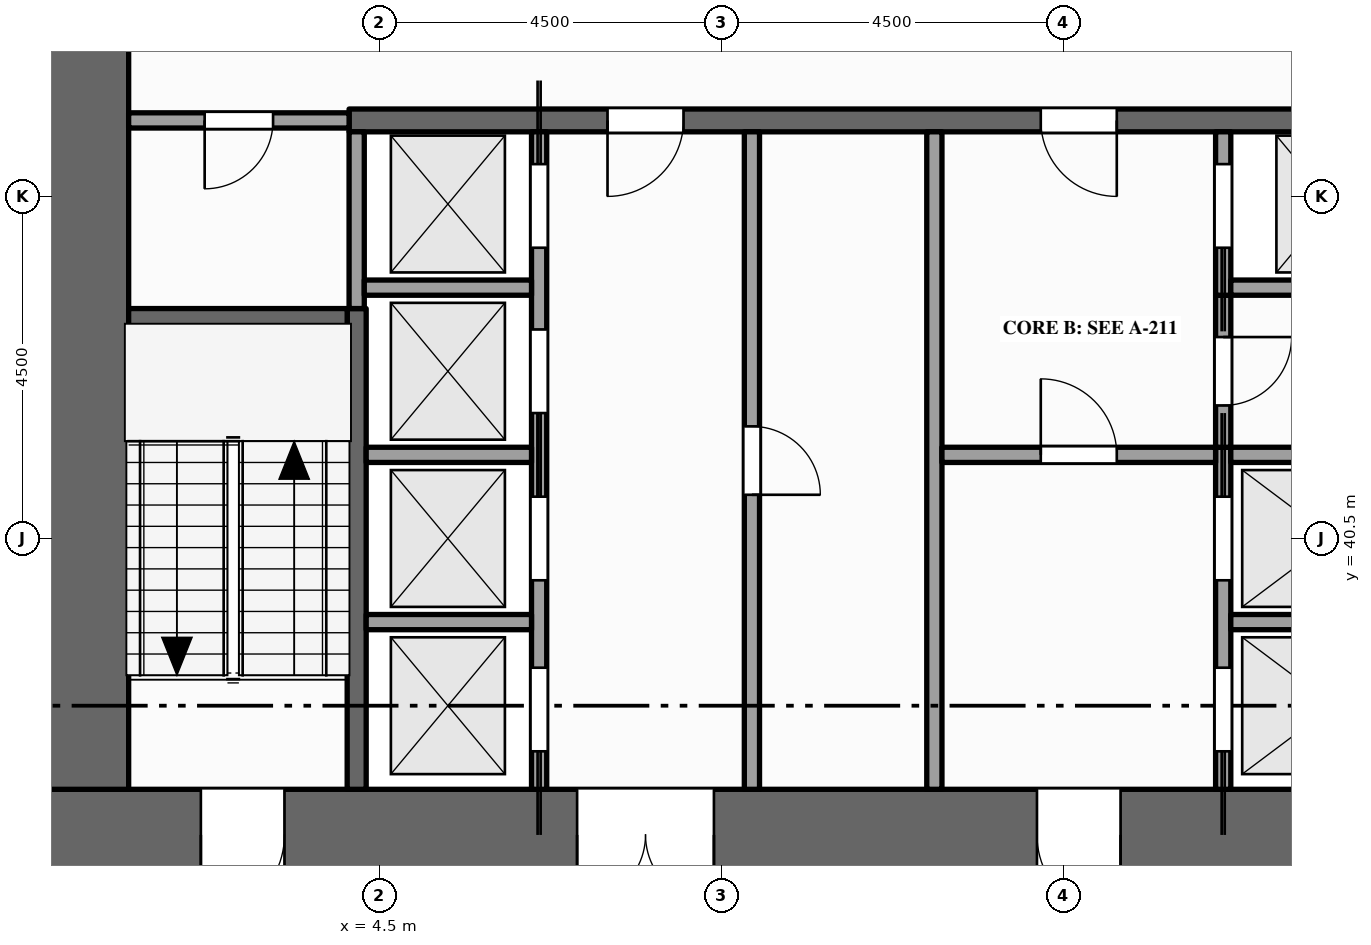
"""IFC4 building model, lengths in metres.
Left out: names, types, materials, properties, quantities, classifications, styles, units other than length and angle.
Written with IfcOpenShell. Run it as: python <this file> out.ifc"""

import sys

from ifc_helpers import new_model, si_unit, direction, frame, frame_2d, origin, place, context, subcontext, project, spatial, rectangle, extrude, element, fill, save


model = new_model("IFC4")
c1 = context("Model", 3, precision=1e-05, world=origin(), true_north=direction((0.0, 1.0)))
c2 = subcontext(c1, "Body", "Model", "MODEL_VIEW")
j1 = project(units=[si_unit("LENGTHUNIT", "METRE"), si_unit("PLANEANGLEUNIT", "RADIAN")], contexts=[c1])
p1 = place(None, origin())
s1 = spatial("IfcSite", under=j1, at=p1, CompositionType="ELEMENT")
p2 = place(p1, origin())
s2 = spatial("IfcBuilding", under=s1, at=p2, CompositionType="ELEMENT")
p3 = place(p2, frame((0.0, 0.0, 57.0)))
s3 = spatial("IfcBuildingStorey", under=s2, at=p3, CompositionType="ELEMENT", Elevation=57.0)
p4 = place(p3, frame((0.0, 36.6, -0.15), z_axis=(0.0, 0.0, 1.0), x_axis=(1.0, 0.0, 0.0)))
e1 = element("IfcWall", 1, at=p4, inside=s3, PredefinedType="SHEAR", context=c2, shape_type="SweptSolid", body=[
    extrude(rectangle(XDim=22.5, YDim=1.2, at=frame_2d((11.25, 0.0))), origin(), (0.0, 0.0, 1.0), 4.0),
])
p5 = place(p4, frame((7.1, 0.0, 0.15)))
e2 = element("IfcOpeningElement", 2, at=p5, cuts=e1, PredefinedType="OPENING", context=c2, shape_type="SweptSolid", body=[
    extrude(rectangle(XDim=1.8, YDim=2.1, at=frame_2d((0.9, 1.05))), frame((0.0, 0.61, 0.0), z_axis=(0.0, -1.0, 0.0), x_axis=(1.0, 0.0, 0.0)), (0.0, 0.0, 1.0), 1.22),
])
p6 = place(p4, frame((13.15, 0.0, 0.15)))
e3 = element("IfcOpeningElement", 3, at=p6, cuts=e1, PredefinedType="OPENING", context=c2, shape_type="SweptSolid", body=[
    extrude(rectangle(XDim=1.1, YDim=2.1, at=frame_2d((0.55, 1.05))), frame((0.0, 0.61, 0.0), z_axis=(0.0, -1.0, 0.0), x_axis=(1.0, 0.0, 0.0)), (0.0, 0.0, 1.0), 1.22),
])
p7 = place(p4, frame((2.15, 0.0, 0.15)))
e4 = element("IfcOpeningElement", 4, at=p7, cuts=e1, PredefinedType="OPENING", context=c2, shape_type="SweptSolid", body=[
    extrude(rectangle(XDim=1.1, YDim=2.1, at=frame_2d((0.55, 1.05))), frame((0.0, 0.61, 0.0), z_axis=(0.0, -1.0, 0.0), x_axis=(1.0, 0.0, 0.0)), (0.0, 0.0, 1.0), 1.22),
])
p8 = place(p4, frame((19.35, 0.0, 0.15)))
e5 = element("IfcOpeningElement", 5, at=p8, cuts=e1, PredefinedType="OPENING", context=c2, shape_type="SweptSolid", body=[
    extrude(rectangle(XDim=1.1, YDim=2.1, at=frame_2d((0.55, 1.05))), frame((0.0, 0.61, 0.0), z_axis=(0.0, -1.0, 0.0), x_axis=(1.0, 0.0, 0.0)), (0.0, 0.0, 1.0), 1.22),
])
p9 = place(p3, frame((0.6, 37.2, -0.15), z_axis=(0.0, 0.0, 1.0), x_axis=(0.0, 1.0, 0.0)))
e6 = element("IfcWall", 6, at=p9, inside=s3, PredefinedType="SHEAR", context=c2, shape_type="SweptSolid", body=[
    extrude(rectangle(XDim=11.1, YDim=1.2, at=frame_2d((5.55, 0.0))), origin(), (0.0, 0.0, 1.0), 4.0),
])
p10 = place(p3, frame((4.2, 37.2, 0.0), z_axis=(0.0, 0.0, 1.0), x_axis=(0.0, 1.0, 0.0)))
e7 = element("IfcWall", 7, at=p10, inside=s3, PredefinedType="SHEAR", context=c2, shape_type="SweptSolid", body=[
    extrude(rectangle(XDim=6.325, YDim=0.25, at=frame_2d((3.163, 0.0))), origin(), (0.0, 0.0, 1.0), 3.85),
])
p11 = place(p3, frame((4.2, 43.525, 0.0), z_axis=(0.0, 0.0, 1.0), x_axis=(0.0, 1.0, 0.0)))
e8 = element("IfcWall", 8, at=p11, inside=s3, PredefinedType="SOLIDWALL", context=c2, shape_type="SweptSolid", body=[
    extrude(rectangle(XDim=2.325, YDim=0.2, at=frame_2d((1.163, 0.0))), origin(), (0.0, 0.0, 1.0), 3.85),
])
p12 = place(p3, frame((6.6, 37.2, 0.0), z_axis=(0.0, 0.0, 1.0), x_axis=(0.0, 1.0, 0.0)))
e9 = element("IfcWall", 9, at=p12, inside=s3, PredefinedType="SOLIDWALL", context=c2, shape_type="SweptSolid", body=[
    extrude(rectangle(XDim=8.65, YDim=0.2, at=frame_2d((4.325, 0.0))), origin(), (0.0, 0.0, 1.0), 3.85),
])
p13 = place(p12, frame((0.5, 0.0, 0.012)))
e10 = element("IfcOpeningElement", 10, at=p13, cuts=e9, PredefinedType="OPENING", context=c2, shape_type="SweptSolid", body=[
    extrude(rectangle(XDim=1.1, YDim=2.1, at=frame_2d((0.55, 1.05))), frame((0.0, 0.11, 0.0), z_axis=(0.0, -1.0, 0.0), x_axis=(1.0, 0.0, 0.0)), (0.0, 0.0, 1.0), 0.22),
])
p14 = place(p12, frame((2.75, 0.0, 0.012)))
e11 = element("IfcOpeningElement", 11, at=p14, cuts=e9, PredefinedType="OPENING", context=c2, shape_type="SweptSolid", body=[
    extrude(rectangle(XDim=1.1, YDim=2.1, at=frame_2d((0.55, 1.05))), frame((0.0, 0.11, 0.0), z_axis=(0.0, -1.0, 0.0), x_axis=(1.0, 0.0, 0.0)), (0.0, 0.0, 1.0), 0.22),
])
p15 = place(p12, frame((4.95, 0.0, 0.012)))
e12 = element("IfcOpeningElement", 12, at=p15, cuts=e9, PredefinedType="OPENING", context=c2, shape_type="SweptSolid", body=[
    extrude(rectangle(XDim=1.1, YDim=2.1, at=frame_2d((0.55, 1.05))), frame((0.0, 0.11, 0.0), z_axis=(0.0, -1.0, 0.0), x_axis=(1.0, 0.0, 0.0)), (0.0, 0.0, 1.0), 0.22),
])
p16 = place(p12, frame((7.125, 0.0, 0.012)))
e13 = element("IfcOpeningElement", 13, at=p16, cuts=e9, PredefinedType="OPENING", context=c2, shape_type="SweptSolid", body=[
    extrude(rectangle(XDim=1.1, YDim=2.1, at=frame_2d((0.55, 1.05))), frame((0.0, 0.11, 0.0), z_axis=(0.0, -1.0, 0.0), x_axis=(1.0, 0.0, 0.0)), (0.0, 0.0, 1.0), 0.22),
])
p17 = place(p3, frame((9.4, 37.2, 0.0), z_axis=(0.0, 0.0, 1.0), x_axis=(0.0, 1.0, 0.0)))
e14 = element("IfcWall", 14, at=p17, inside=s3, PredefinedType="PARTITIONING", context=c2, shape_type="SweptSolid", body=[
    extrude(rectangle(XDim=8.65, YDim=0.2, at=frame_2d((4.325, 0.0))), origin(), (0.0, 0.0, 1.0), 3.85),
])
p18 = place(p17, frame((3.875, 0.0, 0.0)))
e15 = element("IfcOpeningElement", 15, at=p18, cuts=e14, PredefinedType="OPENING", context=c2, shape_type="SweptSolid", body=[
    extrude(rectangle(XDim=0.9, YDim=2.1, at=frame_2d((0.45, 1.05))), frame((0.0, 0.11, 0.0), z_axis=(0.0, -1.0, 0.0), x_axis=(1.0, 0.0, 0.0)), (0.0, 0.0, 1.0), 0.22),
])
p19 = place(p3, frame((11.8, 37.2, 0.0), z_axis=(0.0, 0.0, 1.0), x_axis=(0.0, 1.0, 0.0)))
e16 = element("IfcWall", 16, at=p19, inside=s3, PredefinedType="PARTITIONING", context=c2, shape_type="SweptSolid", body=[
    extrude(rectangle(XDim=8.65, YDim=0.2, at=frame_2d((4.325, 0.0))), origin(), (0.0, 0.0, 1.0), 3.85),
])
p20 = place(p3, frame((15.6, 37.2, 0.0), z_axis=(0.0, 0.0, 1.0), x_axis=(0.0, 1.0, 0.0)))
e17 = element("IfcWall", 17, at=p20, inside=s3, PredefinedType="SOLIDWALL", context=c2, shape_type="SweptSolid", body=[
    extrude(rectangle(XDim=4.5, YDim=0.2, at=frame_2d((2.25, 0.0))), origin(), (0.0, 0.0, 1.0), 3.85),
])
p21 = place(p20, frame((0.5, 0.0, 0.012)))
e18 = element("IfcOpeningElement", 18, at=p21, cuts=e17, PredefinedType="OPENING", context=c2, shape_type="SweptSolid", body=[
    extrude(rectangle(XDim=1.1, YDim=2.1, at=frame_2d((0.55, 1.05))), frame((0.0, 0.11, 0.0), z_axis=(0.0, -1.0, 0.0), x_axis=(1.0, 0.0, 0.0)), (0.0, 0.0, 1.0), 0.22),
])
p22 = place(p20, frame((2.75, 0.0, 0.012)))
e19 = element("IfcOpeningElement", 19, at=p22, cuts=e17, PredefinedType="OPENING", context=c2, shape_type="SweptSolid", body=[
    extrude(rectangle(XDim=1.1, YDim=2.1, at=frame_2d((0.55, 1.05))), frame((0.0, 0.11, 0.0), z_axis=(0.0, -1.0, 0.0), x_axis=(1.0, 0.0, 0.0)), (0.0, 0.0, 1.0), 0.22),
])
p23 = place(p3, frame((15.6, 41.7, 0.0), z_axis=(0.0, 0.0, 1.0), x_axis=(0.0, 1.0, 0.0)))
e20 = element("IfcWall", 20, at=p23, inside=s3, PredefinedType="PARTITIONING", context=c2, shape_type="SweptSolid", body=[
    extrude(rectangle(XDim=2.0, YDim=0.2, at=frame_2d((1.0, 0.0))), origin(), (0.0, 0.0, 1.0), 3.85),
])
p24 = place(p23, frame((0.55, 0.0, 0.0)))
e21 = element("IfcOpeningElement", 21, at=p24, cuts=e20, PredefinedType="OPENING", context=c2, shape_type="SweptSolid", body=[
    extrude(rectangle(XDim=0.9, YDim=2.1, at=frame_2d((0.45, 1.05))), frame((0.0, 0.11, 0.0), z_axis=(0.0, -1.0, 0.0), x_axis=(1.0, 0.0, 0.0)), (0.0, 0.0, 1.0), 0.22),
])
p25 = place(p3, frame((15.6, 43.7, 0.0), z_axis=(0.0, 0.0, 1.0), x_axis=(0.0, 1.0, 0.0)))
e22 = element("IfcWall", 22, at=p25, inside=s3, PredefinedType="SOLIDWALL", context=c2, shape_type="SweptSolid", body=[
    extrude(rectangle(XDim=2.15, YDim=0.2, at=frame_2d((1.075, 0.0))), origin(), (0.0, 0.0, 1.0), 3.85),
])
p26 = place(p25, frame((0.625, 0.0, 0.012)))
e23 = element("IfcOpeningElement", 23, at=p26, cuts=e22, PredefinedType="OPENING", context=c2, shape_type="SweptSolid", body=[
    extrude(rectangle(XDim=1.1, YDim=2.1, at=frame_2d((0.55, 1.05))), frame((0.0, 0.11, 0.0), z_axis=(0.0, -1.0, 0.0), x_axis=(1.0, 0.0, 0.0)), (0.0, 0.0, 1.0), 0.22),
])
p27 = place(p3, frame((4.325, 39.4, 0.0), z_axis=(0.0, 0.0, 1.0), x_axis=(1.0, 0.0, 0.0)))
e24 = element("IfcWall", 24, at=p27, inside=s3, PredefinedType="SOLIDWALL", context=c2, shape_type="SweptSolid", body=[
    extrude(rectangle(XDim=2.175, YDim=0.2, at=frame_2d((1.087, 0.0))), origin(), (0.0, 0.0, 1.0), 3.85),
])
p28 = place(p3, frame((15.7, 39.4, 0.0), z_axis=(0.0, 0.0, 1.0), x_axis=(1.0, 0.0, 0.0)))
e25 = element("IfcWall", 25, at=p28, inside=s3, PredefinedType="SOLIDWALL", context=c2, shape_type="SweptSolid", body=[
    extrude(rectangle(XDim=2.675, YDim=0.2, at=frame_2d((1.337, 0.0))), origin(), (0.0, 0.0, 1.0), 3.85),
])
p29 = place(p3, frame((4.325, 41.6, 0.0), z_axis=(0.0, 0.0, 1.0), x_axis=(1.0, 0.0, 0.0)))
e26 = element("IfcWall", 26, at=p29, inside=s3, PredefinedType="SOLIDWALL", context=c2, shape_type="SweptSolid", body=[
    extrude(rectangle(XDim=2.175, YDim=0.2, at=frame_2d((1.087, 0.0))), origin(), (0.0, 0.0, 1.0), 3.85),
])
p30 = place(p3, frame((11.9, 41.6, 0.0), z_axis=(0.0, 0.0, 1.0), x_axis=(1.0, 0.0, 0.0)))
e27 = element("IfcWall", 27, at=p30, inside=s3, PredefinedType="PARTITIONING", context=c2, shape_type="SweptSolid", body=[
    extrude(rectangle(XDim=3.6, YDim=0.2, at=frame_2d((1.8, 0.0))), origin(), (0.0, 0.0, 1.0), 3.85),
])
p31 = place(p30, frame((1.3, 0.0, 0.0)))
e28 = element("IfcOpeningElement", 28, at=p31, cuts=e27, PredefinedType="OPENING", context=c2, shape_type="SweptSolid", body=[
    extrude(rectangle(XDim=1.0, YDim=2.1, at=frame_2d((0.5, 1.05))), frame((0.0, 0.11, 0.0), z_axis=(0.0, -1.0, 0.0), x_axis=(1.0, 0.0, 0.0)), (0.0, 0.0, 1.0), 0.22),
])
p32 = place(p3, frame((15.7, 41.6, 0.0), z_axis=(0.0, 0.0, 1.0), x_axis=(1.0, 0.0, 0.0)))
e29 = element("IfcWall", 29, at=p32, inside=s3, PredefinedType="SOLIDWALL", context=c2, shape_type="SweptSolid", body=[
    extrude(rectangle(XDim=2.675, YDim=0.2, at=frame_2d((1.337, 0.0))), origin(), (0.0, 0.0, 1.0), 3.85),
])
p33 = place(p3, frame((1.2, 43.4, 0.0), z_axis=(0.0, 0.0, 1.0), x_axis=(1.0, 0.0, 0.0)))
e30 = element("IfcWall", 30, at=p33, inside=s3, PredefinedType="SHEAR", context=c2, shape_type="SweptSolid", body=[
    extrude(rectangle(XDim=2.875, YDim=0.25, at=frame_2d((1.438, 0.0))), origin(), (0.0, 0.0, 1.0), 3.85),
])
p34 = place(p3, frame((4.3, 43.8, 0.0), z_axis=(0.0, 0.0, 1.0), x_axis=(1.0, 0.0, 0.0)))
e31 = element("IfcWall", 31, at=p34, inside=s3, PredefinedType="SOLIDWALL", context=c2, shape_type="SweptSolid", body=[
    extrude(rectangle(XDim=2.2, YDim=0.2, at=frame_2d((1.1, 0.0))), origin(), (0.0, 0.0, 1.0), 3.85),
])
p35 = place(p3, frame((15.7, 43.8, 0.0), z_axis=(0.0, 0.0, 1.0), x_axis=(1.0, 0.0, 0.0)))
e32 = element("IfcWall", 32, at=p35, inside=s3, PredefinedType="SOLIDWALL", context=c2, shape_type="SweptSolid", body=[
    extrude(rectangle(XDim=2.7, YDim=0.2, at=frame_2d((1.35, 0.0))), origin(), (0.0, 0.0, 1.0), 3.85),
])
p36 = place(p3, frame((1.2, 46.0, 0.0), z_axis=(0.0, 0.0, 1.0), x_axis=(1.0, 0.0, 0.0)))
e33 = element("IfcWall", 33, at=p36, inside=s3, PredefinedType="PARTITIONING", context=c2, shape_type="SweptSolid", body=[
    extrude(rectangle(XDim=2.9, YDim=0.2, at=frame_2d((1.45, 0.0))), origin(), (0.0, 0.0, 1.0), 3.85),
])
p37 = place(p36, frame((1.0, 0.0, 0.0)))
e34 = element("IfcOpeningElement", 34, at=p37, cuts=e33, PredefinedType="OPENING", context=c2, shape_type="SweptSolid", body=[
    extrude(rectangle(XDim=0.9, YDim=2.1, at=frame_2d((0.45, 1.05))), frame((0.0, 0.11, 0.0), z_axis=(0.0, -1.0, 0.0), x_axis=(1.0, 0.0, 0.0)), (0.0, 0.0, 1.0), 0.22),
])
p38 = place(p3, frame((4.1, 46.0, 0.0), z_axis=(0.0, 0.0, 1.0), x_axis=(1.0, 0.0, 0.0)))
e35 = element("IfcWall", 35, at=p38, inside=s3, PredefinedType="SHEAR", context=c2, shape_type="SweptSolid", body=[
    extrude(rectangle(XDim=14.5, YDim=0.3, at=frame_2d((7.25, 0.0))), origin(), (0.0, 0.0, 1.0), 3.85),
])
p39 = place(p38, frame((3.4, 0.0, 0.0)))
e36 = element("IfcOpeningElement", 36, at=p39, cuts=e35, PredefinedType="OPENING", context=c2, shape_type="SweptSolid", body=[
    extrude(rectangle(XDim=1.0, YDim=2.1, at=frame_2d((0.5, 1.05))), frame((0.0, 0.16, 0.0), z_axis=(0.0, -1.0, 0.0), x_axis=(1.0, 0.0, 0.0)), (0.0, 0.0, 1.0), 0.32),
])
p40 = place(p38, frame((9.1, 0.0, 0.0)))
e37 = element("IfcOpeningElement", 37, at=p40, cuts=e35, PredefinedType="OPENING", context=c2, shape_type="SweptSolid", body=[
    extrude(rectangle(XDim=1.0, YDim=2.1, at=frame_2d((0.5, 1.05))), frame((0.0, 0.16, 0.0), z_axis=(0.0, -1.0, 0.0), x_axis=(1.0, 0.0, 0.0)), (0.0, 0.0, 1.0), 0.32),
])
p41 = place(p13, origin())
e38 = element("IfcDoor", 38, at=p41, inside=s3, OperationType="SLIDING_TO_LEFT", PredefinedType="DOOR", context=c2, shape_type="SweptSolid", body=[
    extrude(rectangle(XDim=1.1, YDim=2.1, at=frame_2d((0.55, 1.05))), frame((0.0, 0.025, 0.0), z_axis=(0.0, -1.0, 0.0), x_axis=(1.0, 0.0, 0.0)), (0.0, 0.0, 1.0), 0.05),
])
fill(e10, e38)
p42 = place(p14, origin())
e39 = element("IfcDoor", 39, at=p42, inside=s3, OperationType="SLIDING_TO_RIGHT", PredefinedType="DOOR", context=c2, shape_type="SweptSolid", body=[
    extrude(rectangle(XDim=1.1, YDim=2.1, at=frame_2d((0.55, 1.05))), frame((0.0, 0.025, 0.0), z_axis=(0.0, -1.0, 0.0), x_axis=(1.0, 0.0, 0.0)), (0.0, 0.0, 1.0), 0.05),
])
fill(e11, e39)
p43 = place(p15, origin())
e40 = element("IfcDoor", 40, at=p43, inside=s3, OperationType="SLIDING_TO_LEFT", PredefinedType="DOOR", context=c2, shape_type="SweptSolid", body=[
    extrude(rectangle(XDim=1.1, YDim=2.1, at=frame_2d((0.55, 1.05))), frame((0.0, 0.025, 0.0), z_axis=(0.0, -1.0, 0.0), x_axis=(1.0, 0.0, 0.0)), (0.0, 0.0, 1.0), 0.05),
])
fill(e12, e40)
p44 = place(p16, origin())
e41 = element("IfcDoor", 41, at=p44, inside=s3, OperationType="SLIDING_TO_RIGHT", PredefinedType="DOOR", context=c2, shape_type="SweptSolid", body=[
    extrude(rectangle(XDim=1.1, YDim=2.1, at=frame_2d((0.55, 1.05))), frame((0.0, 0.025, 0.0), z_axis=(0.0, -1.0, 0.0), x_axis=(1.0, 0.0, 0.0)), (0.0, 0.0, 1.0), 0.05),
])
fill(e13, e41)
p45 = place(p21, origin())
e42 = element("IfcDoor", 42, at=p45, inside=s3, OperationType="SLIDING_TO_LEFT", PredefinedType="DOOR", context=c2, shape_type="SweptSolid", body=[
    extrude(rectangle(XDim=1.1, YDim=2.1, at=frame_2d((0.55, 1.05))), frame((0.0, 0.025, 0.0), z_axis=(0.0, -1.0, 0.0), x_axis=(1.0, 0.0, 0.0)), (0.0, 0.0, 1.0), 0.05),
])
fill(e18, e42)
p46 = place(p22, origin())
e43 = element("IfcDoor", 43, at=p46, inside=s3, OperationType="SLIDING_TO_RIGHT", PredefinedType="DOOR", context=c2, shape_type="SweptSolid", body=[
    extrude(rectangle(XDim=1.1, YDim=2.1, at=frame_2d((0.55, 1.05))), frame((0.0, 0.025, 0.0), z_axis=(0.0, -1.0, 0.0), x_axis=(1.0, 0.0, 0.0)), (0.0, 0.0, 1.0), 0.05),
])
fill(e19, e43)
p47 = place(p26, origin())
e44 = element("IfcDoor", 44, at=p47, inside=s3, OperationType="SLIDING_TO_LEFT", PredefinedType="DOOR", context=c2, shape_type="SweptSolid", body=[
    extrude(rectangle(XDim=1.1, YDim=2.1, at=frame_2d((0.55, 1.05))), frame((0.0, 0.025, 0.0), z_axis=(0.0, -1.0, 0.0), x_axis=(1.0, 0.0, 0.0)), (0.0, 0.0, 1.0), 0.05),
])
fill(e23, e44)
p48 = place(p5, origin())
e45 = element("IfcDoor", 45, at=p48, inside=s3, OperationType="DOUBLE_DOOR_SINGLE_SWING", PredefinedType="DOOR", context=c2, shape_type="SweptSolid", body=[
    extrude(rectangle(XDim=1.8, YDim=2.1, at=frame_2d((0.9, 1.05))), frame((0.0, 0.025, 0.0), z_axis=(0.0, -1.0, 0.0), x_axis=(1.0, 0.0, 0.0)), (0.0, 0.0, 1.0), 0.05),
])
fill(e2, e45)
p49 = place(p39, origin())
e46 = element("IfcDoor", 46, at=p49, inside=s3, OperationType="SINGLE_SWING_LEFT", PredefinedType="DOOR", context=c2, shape_type="SweptSolid", body=[
    extrude(rectangle(XDim=1.0, YDim=2.1, at=frame_2d((0.5, 1.05))), frame((0.0, 0.025, 0.0), z_axis=(0.0, -1.0, 0.0), x_axis=(1.0, 0.0, 0.0)), (0.0, 0.0, 1.0), 0.05),
])
fill(e36, e46)
p50 = place(p6, origin())
e47 = element("IfcDoor", 47, at=p50, inside=s3, OperationType="SINGLE_SWING_RIGHT", PredefinedType="DOOR", context=c2, shape_type="SweptSolid", body=[
    extrude(rectangle(XDim=1.1, YDim=2.1, at=frame_2d((0.55, 1.05))), frame((0.0, 0.025, 0.0), z_axis=(0.0, -1.0, 0.0), x_axis=(1.0, 0.0, 0.0)), (0.0, 0.0, 1.0), 0.05),
])
fill(e3, e47)
p51 = place(p31, origin())
e48 = element("IfcDoor", 48, at=p51, inside=s3, OperationType="SINGLE_SWING_LEFT", PredefinedType="DOOR", context=c2, shape_type="SweptSolid", body=[
    extrude(rectangle(XDim=1.0, YDim=2.1, at=frame_2d((0.5, 1.05))), frame((0.0, 0.025, 0.0), z_axis=(0.0, -1.0, 0.0), x_axis=(1.0, 0.0, 0.0)), (0.0, 0.0, 1.0), 0.05),
])
fill(e28, e48)
p52 = place(p40, origin())
e49 = element("IfcDoor", 49, at=p52, inside=s3, OperationType="SINGLE_SWING_RIGHT", PredefinedType="DOOR", context=c2, shape_type="SweptSolid", body=[
    extrude(rectangle(XDim=1.0, YDim=2.1, at=frame_2d((0.5, 1.05))), frame((0.0, 0.025, 0.0), z_axis=(0.0, -1.0, 0.0), x_axis=(1.0, 0.0, 0.0)), (0.0, 0.0, 1.0), 0.05),
])
fill(e37, e49)
p53 = place(p7, origin())
e50 = element("IfcDoor", 50, at=p53, inside=s3, OperationType="SINGLE_SWING_LEFT", PredefinedType="DOOR", context=c2, shape_type="SweptSolid", body=[
    extrude(rectangle(XDim=1.1, YDim=2.1, at=frame_2d((0.55, 1.05))), frame((0.0, 0.025, 0.0), z_axis=(0.0, -1.0, 0.0), x_axis=(1.0, 0.0, 0.0)), (0.0, 0.0, 1.0), 0.05),
])
fill(e4, e50)
p54 = place(p37, origin())
e51 = element("IfcDoor", 51, at=p54, inside=s3, OperationType="SINGLE_SWING_LEFT", PredefinedType="DOOR", context=c2, shape_type="SweptSolid", body=[
    extrude(rectangle(XDim=0.9, YDim=2.1, at=frame_2d((0.45, 1.05))), frame((0.0, 0.025, 0.0), z_axis=(0.0, -1.0, 0.0), x_axis=(1.0, 0.0, 0.0)), (0.0, 0.0, 1.0), 0.05),
])
fill(e34, e51)
p55 = place(p18, origin())
e52 = element("IfcDoor", 52, at=p55, inside=s3, OperationType="SINGLE_SWING_LEFT", PredefinedType="DOOR", context=c2, shape_type="SweptSolid", body=[
    extrude(rectangle(XDim=0.9, YDim=2.1, at=frame_2d((0.45, 1.05))), frame((0.0, 0.025, 0.0), z_axis=(0.0, -1.0, 0.0), x_axis=(1.0, 0.0, 0.0)), (0.0, 0.0, 1.0), 0.05),
])
fill(e15, e52)
p56 = place(p24, origin())
e53 = element("IfcDoor", 53, at=p56, inside=s3, OperationType="SINGLE_SWING_RIGHT", PredefinedType="DOOR", context=c2, shape_type="SweptSolid", body=[
    extrude(rectangle(XDim=0.9, YDim=2.1, at=frame_2d((0.45, 1.05))), frame((0.0, 0.025, 0.0), z_axis=(0.0, -1.0, 0.0), x_axis=(1.0, 0.0, 0.0)), (0.0, 0.0, 1.0), 0.05),
])
fill(e21, e53)
save(model, sys.argv[1])
